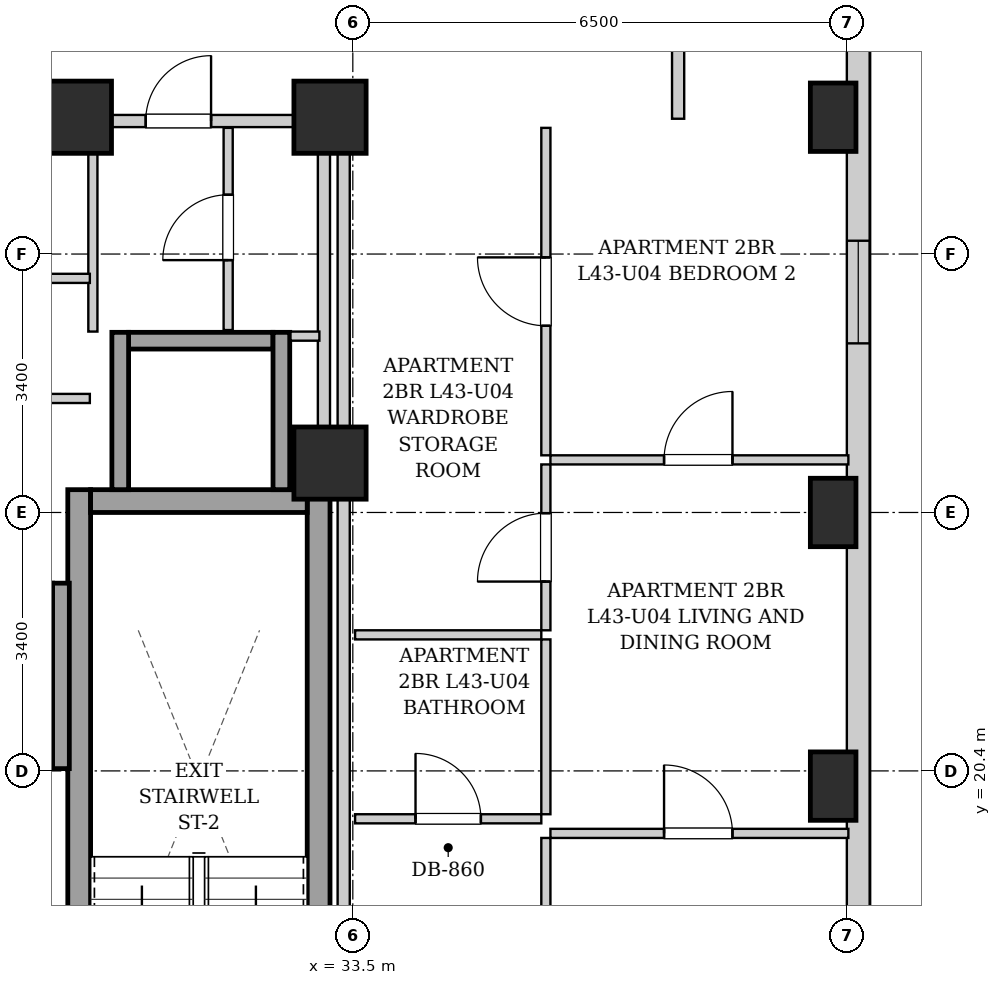
"""IFC4 building model, lengths in metres.
Left out: names, types, materials, properties, quantities, classifications, styles, units other than length and angle.
Written with IfcOpenShell. Run it as: python <this file> out.ifc"""

import sys

from ifc_helpers import new_model, si_unit, direction, frame, frame_2d, origin, origin_2d, place, context, subcontext, project, spatial, rectangle, extrude, element, fill, save


model = new_model("IFC4")
c1 = context("Model", 3, precision=1e-05, world=origin(), true_north=direction((0.0, 1.0)))
c2 = subcontext(c1, "Body", "Model", "MODEL_VIEW")
j1 = project(units=[si_unit("LENGTHUNIT", "METRE"), si_unit("PLANEANGLEUNIT", "RADIAN")], contexts=[c1])
p1 = place(None, origin())
s1 = spatial("IfcSite", under=j1, at=p1, CompositionType="ELEMENT")
p2 = place(p1, origin())
s2 = spatial("IfcBuilding", under=s1, at=p2, CompositionType="ELEMENT")
p3 = place(p2, frame((0.0, 0.0, 150.4)))
s3 = spatial("IfcBuildingStorey", under=s2, at=p3, CompositionType="ELEMENT", Elevation=150.4)
for number, where, z_axis, x_axis in (
    (1, (39.82, 20.2, 0.0), (0.0, 0.0, 1.0), (1.0, 0.0, 0.0)),
    (2, (39.82, 23.8, 0.0), (0.0, 0.0, 1.0), (1.0, 0.0, 0.0)),
    (3, (39.82, 29.0, 0.0), (0.0, 0.0, 1.0), (1.0, 0.0, 0.0)),
):
    element("IfcColumn", number, at=place(p3, frame(where, z_axis=z_axis, x_axis=x_axis)), inside=s3, PredefinedType="COLUMN", context=c2, shape_type="SweptSolid", body=[
        extrude(rectangle(XDim=0.6, YDim=0.9, at=origin_2d()), origin(), (0.0, 0.0, 1.0), 3.25),
    ])
for number, where, z_axis, x_axis in (
    (4, (29.85, 29.0, 0.0), (0.0, 0.0, 1.0), (1.0, 0.0, 0.0)),
    (5, (33.2, 29.0, 0.0), (0.0, 0.0, 1.0), (1.0, 0.0, 0.0)),
    (6, (33.2, 24.45, 0.0), (0.0, 0.0, 1.0), (1.0, 0.0, 0.0)),
):
    element("IfcColumn", number, at=place(p3, frame(where, z_axis=z_axis, x_axis=x_axis)), inside=s3, PredefinedType="COLUMN", context=c2, shape_type="SweptSolid", body=[
        extrude(rectangle(XDim=0.95, YDim=0.95, at=origin_2d()), origin(), (0.0, 0.0, 1.0), 3.25),
    ])
p4 = place(p3, frame((40.15, 40.8, 0.0), z_axis=(0.0, 0.0, 1.0), x_axis=(0.0, -1.0, 0.0)))
e7 = element("IfcWall", 7, at=p4, inside=s3, PredefinedType="SOLIDWALL", context=c2, shape_type="SweptSolid", body=[
    extrude(rectangle(XDim=34.5, YDim=0.3, at=frame_2d((17.25, 0.0))), origin(), (0.0, 0.0, 1.0), 2.99),
])
p5 = place(p4, frame((31.725, 0.0, 0.55)))
e8 = element("IfcOpeningElement", 8, at=p5, cuts=e7, PredefinedType="OPENING", context=c2, shape_type="SweptSolid", body=[
    extrude(rectangle(XDim=1.35, YDim=1.2, at=frame_2d((0.675, 0.6))), frame((0.0, 0.16, 0.0), z_axis=(0.0, -1.0, 0.0), x_axis=(1.0, 0.0, 0.0)), (0.0, 0.0, 1.0), 0.32),
])
p6 = place(p4, frame((22.8, 0.0, 0.55)))
e9 = element("IfcOpeningElement", 9, at=p6, cuts=e7, PredefinedType="OPENING", context=c2, shape_type="SweptSolid", body=[
    extrude(rectangle(XDim=1.35, YDim=1.2, at=frame_2d((0.675, 0.6))), frame((0.0, 0.16, 0.0), z_axis=(0.0, -1.0, 0.0), x_axis=(1.0, 0.0, 0.0)), (0.0, 0.0, 1.0), 0.32),
])
p7 = place(p4, frame((13.425, 0.0, 0.55)))
e10 = element("IfcOpeningElement", 10, at=p7, cuts=e7, PredefinedType="OPENING", context=c2, shape_type="SweptSolid", body=[
    extrude(rectangle(XDim=1.35, YDim=1.2, at=frame_2d((0.675, 0.6))), frame((0.0, 0.16, 0.0), z_axis=(0.0, -1.0, 0.0), x_axis=(1.0, 0.0, 0.0)), (0.0, 0.0, 1.0), 0.32),
])
for number, where, z_axis, x_axis in (
    (11, (29.9, 15.1, 0.0), (0.0, 0.0, 1.0), (0.0, 1.0, 0.0)),
    (12, (33.05, 15.1, 0.0), (0.0, 0.0, 1.0), (0.0, 1.0, 0.0)),
):
    element("IfcWall", number, at=place(p3, frame(where, z_axis=z_axis, x_axis=x_axis)), inside=s3, PredefinedType="SHEAR", context=c2, shape_type="SweptSolid", body=[
        extrude(rectangle(XDim=9.0, YDim=0.3, at=frame_2d((4.5, 0.0))), origin(), (0.0, 0.0, 1.0), 2.99),
    ])
p8 = place(p3, frame((30.05, 23.95, 0.0), z_axis=(0.0, 0.0, 1.0), x_axis=(1.0, 0.0, 0.0)))
e13 = element("IfcWall", 13, at=p8, inside=s3, PredefinedType="SHEAR", context=c2, shape_type="SweptSolid", body=[
    extrude(rectangle(XDim=2.85, YDim=0.3, at=frame_2d((1.425, 0.0))), origin(), (0.0, 0.0, 1.0), 2.99),
])
p9 = place(p3, frame((27.65, 20.54, 0.0), z_axis=(0.0, 0.0, 1.0), x_axis=(1.0, 0.0, 0.0)))
e14 = element("IfcWall", 14, at=p9, inside=s3, PredefinedType="SHEAR", context=c2, shape_type="SweptSolid", body=[
    extrude(rectangle(XDim=1.9, YDim=0.22, at=frame_2d((0.95, 0.0))), origin(), (0.0, 0.0, 1.0), 2.99),
])
p10 = place(p3, frame((27.65, 22.76, 0.0), z_axis=(0.0, 0.0, 1.0), x_axis=(1.0, 0.0, 0.0)))
e15 = element("IfcWall", 15, at=p10, inside=s3, PredefinedType="SHEAR", context=c2, shape_type="SweptSolid", body=[
    extrude(rectangle(XDim=1.9, YDim=0.22, at=frame_2d((0.95, 0.0))), origin(), (0.0, 0.0, 1.0), 2.99),
])
p11 = place(p10, frame((0.4, 0.0, 0.0)))
e16 = element("IfcOpeningElement", 16, at=p11, cuts=e15, PredefinedType="OPENING", context=c2, shape_type="SweptSolid", body=[
    extrude(rectangle(XDim=1.1, YDim=2.15, at=frame_2d((0.55, 1.075))), frame((0.0, 0.12, 0.0), z_axis=(0.0, -1.0, 0.0), x_axis=(1.0, 0.0, 0.0)), (0.0, 0.0, 1.0), 0.24),
])
p12 = place(p3, frame((29.66, 20.43, 0.0), z_axis=(0.0, 0.0, 1.0), x_axis=(0.0, 1.0, 0.0)))
e17 = element("IfcWall", 17, at=p12, inside=s3, PredefinedType="SHEAR", context=c2, shape_type="SweptSolid", body=[
    extrude(rectangle(XDim=2.44, YDim=0.22, at=frame_2d((1.22, 0.0))), origin(), (0.0, 0.0, 1.0), 2.99),
])
p13 = place(p3, frame((30.55, 26.06, 0.0), z_axis=(0.0, 0.0, 1.0), x_axis=(1.0, 0.0, 0.0)))
e18 = element("IfcWall", 18, at=p13, inside=s3, PredefinedType="SHEAR", context=c2, shape_type="SweptSolid", body=[
    extrude(rectangle(XDim=1.9, YDim=0.22, at=frame_2d((0.95, 0.0))), origin(), (0.0, 0.0, 1.0), 2.99),
])
for number, where, z_axis, x_axis in (
    (19, (30.44, 24.1, 0.0), (0.0, 0.0, 1.0), (0.0, 1.0, 0.0)),
    (20, (32.56, 24.1, 0.0), (0.0, 0.0, 1.0), (0.0, 1.0, 0.0)),
):
    element("IfcWall", number, at=place(p3, frame(where, z_axis=z_axis, x_axis=x_axis)), inside=s3, PredefinedType="SHEAR", context=c2, shape_type="SweptSolid", body=[
        extrude(rectangle(XDim=2.07, YDim=0.22, at=frame_2d((1.035, 0.0))), origin(), (0.0, 0.0, 1.0), 2.99),
    ])
p14 = place(p3, frame((33.12, 24.12, 0.0), z_axis=(0.0, 0.0, 1.0), x_axis=(0.0, 1.0, 0.0)))
e21 = element("IfcWall", 21, at=p14, inside=s3, PredefinedType="PARTITIONING", context=c2, shape_type="SweptSolid", body=[
    extrude(rectangle(XDim=4.76, YDim=0.16, at=frame_2d((2.38, 0.0))), origin(), (0.0, 0.0, 1.0), 2.99),
])
p15 = place(p3, frame((30.08, 26.18, 0.0), z_axis=(0.0, 0.0, 1.0), x_axis=(0.0, 1.0, 0.0)))
e22 = element("IfcWall", 22, at=p15, inside=s3, PredefinedType="PARTITIONING", context=c2, shape_type="SweptSolid", body=[
    extrude(rectangle(XDim=2.68, YDim=0.12, at=frame_2d((1.34, 0.0))), origin(), (0.0, 0.0, 1.0), 2.99),
])
p16 = place(p3, frame((32.68, 26.12, 0.0), z_axis=(0.0, 0.0, 1.0), x_axis=(1.0, 0.0, 0.0)))
e23 = element("IfcWall", 23, at=p16, inside=s3, PredefinedType="PARTITIONING", context=c2, shape_type="SweptSolid", body=[
    extrude(rectangle(XDim=0.38, YDim=0.12, at=frame_2d((0.19, 0.0))), origin(), (0.0, 0.0, 1.0), 2.99),
])
p17 = place(p3, frame((31.86, 26.2, 0.0), z_axis=(0.0, 0.0, 1.0), x_axis=(0.0, 1.0, 0.0)))
e24 = element("IfcWall", 24, at=p17, inside=s3, PredefinedType="PARTITIONING", context=c2, shape_type="SweptSolid", body=[
    extrude(rectangle(XDim=2.66, YDim=0.12, at=frame_2d((1.33, 0.0))), origin(), (0.0, 0.0, 1.0), 2.99),
])
p18 = place(p17, frame((0.92, 0.0, 0.0)))
e25 = element("IfcOpeningElement", 25, at=p18, cuts=e24, PredefinedType="OPENING", context=c2, shape_type="SweptSolid", body=[
    extrude(rectangle(XDim=0.86, YDim=2.05, at=frame_2d((0.43, 1.025))), frame((0.0, 0.07, 0.0), z_axis=(0.0, -1.0, 0.0), x_axis=(1.0, 0.0, 0.0)), (0.0, 0.0, 1.0), 0.14),
])
p19 = place(p3, frame((30.08, 28.95, 0.0), z_axis=(0.0, 0.0, 1.0), x_axis=(1.0, 0.0, 0.0)))
e26 = element("IfcWall", 26, at=p19, inside=s3, PredefinedType="PARTITIONING", context=c2, shape_type="SweptSolid", body=[
    extrude(rectangle(XDim=2.96, YDim=0.16, at=frame_2d((1.48, 0.0))), origin(), (0.0, 0.0, 1.0), 2.99),
])
p20 = place(p19, frame((0.695, 0.0, 0.0)))
e27 = element("IfcOpeningElement", 27, at=p20, cuts=e26, PredefinedType="OPENING", context=c2, shape_type="SweptSolid", body=[
    extrude(rectangle(XDim=0.86, YDim=2.05, at=frame_2d((0.43, 1.025))), frame((0.0, 0.09, 0.0), z_axis=(0.0, -1.0, 0.0), x_axis=(1.0, 0.0, 0.0)), (0.0, 0.0, 1.0), 0.18),
])
p21 = place(p3, frame((25.72, 26.88, 0.0), z_axis=(0.0, 0.0, 1.0), x_axis=(1.0, 0.0, 0.0)))
e28 = element("IfcWall", 28, at=p21, inside=s3, PredefinedType="PARTITIONING", context=c2, shape_type="SweptSolid", body=[
    extrude(rectangle(XDim=4.32, YDim=0.12, at=frame_2d((2.16, 0.0))), origin(), (0.0, 0.0, 1.0), 2.99),
])
p22 = place(p3, frame((25.72, 25.3, 0.0), z_axis=(0.0, 0.0, 1.0), x_axis=(1.0, 0.0, 0.0)))
e29 = element("IfcWall", 29, at=p22, inside=s3, PredefinedType="PARTITIONING", context=c2, shape_type="SweptSolid", body=[
    extrude(rectangle(XDim=4.32, YDim=0.12, at=frame_2d((2.16, 0.0))), origin(), (0.0, 0.0, 1.0), 2.99),
])
p23 = place(p22, frame((1.65, 0.0, 0.0)))
e30 = element("IfcOpeningElement", 30, at=p23, cuts=e29, PredefinedType="OPENING", context=c2, shape_type="SweptSolid", body=[
    extrude(rectangle(XDim=0.9, YDim=2.05, at=frame_2d((0.45, 1.025))), frame((0.0, 0.07, 0.0), z_axis=(0.0, -1.0, 0.0), x_axis=(1.0, 0.0, 0.0)), (0.0, 0.0, 1.0), 0.14),
])
p24 = place(p3, frame((25.72, 28.95, 0.0), z_axis=(0.0, 0.0, 1.0), x_axis=(1.0, 0.0, 0.0)))
e31 = element("IfcWall", 31, at=p24, inside=s3, PredefinedType="PARTITIONING", context=c2, shape_type="SweptSolid", body=[
    extrude(rectangle(XDim=4.32, YDim=0.16, at=frame_2d((2.16, 0.0))), origin(), (0.0, 0.0, 1.0), 2.442),
])
p25 = place(p24, frame((1.27, 0.0, 0.0)))
e32 = element("IfcOpeningElement", 32, at=p25, cuts=e31, PredefinedType="OPENING", context=c2, shape_type="SweptSolid", body=[
    extrude(rectangle(XDim=0.86, YDim=2.05, at=frame_2d((0.43, 1.025))), frame((0.0, 0.09, 0.0), z_axis=(0.0, -1.0, 0.0), x_axis=(1.0, 0.0, 0.0)), (0.0, 0.0, 1.0), 0.18),
])
p26 = place(p3, frame((37.78, 28.98, 0.0), z_axis=(0.0, 0.0, 1.0), x_axis=(0.0, 1.0, 0.0)))
e33 = element("IfcWall", 33, at=p26, inside=s3, PredefinedType="PARTITIONING", context=c2, shape_type="SweptSolid", body=[
    extrude(rectangle(XDim=1.74, YDim=0.16, at=frame_2d((0.87, 0.0))), origin(), (0.0, 0.0, 1.0), 2.99),
])
p27 = place(p3, frame((33.53, 22.19, 0.0), z_axis=(0.0, 0.0, 1.0), x_axis=(1.0, 0.0, 0.0)))
e34 = element("IfcWall", 34, at=p27, inside=s3, PredefinedType="PARTITIONING", context=c2, shape_type="SweptSolid", body=[
    extrude(rectangle(XDim=2.45, YDim=0.12, at=frame_2d((1.225, 0.0))), origin(), (0.0, 0.0, 1.0), 2.99),
])
p28 = place(p3, frame((36.04, 22.25, 0.0), z_axis=(0.0, 0.0, 1.0), x_axis=(0.0, 1.0, 0.0)))
e35 = element("IfcWall", 35, at=p28, inside=s3, PredefinedType="PARTITIONING", context=c2, shape_type="SweptSolid", body=[
    extrude(rectangle(XDim=2.182, YDim=0.12, at=frame_2d((1.091, 0.0))), origin(), (0.0, 0.0, 1.0), 2.99),
])
p29 = place(p28, frame((0.641, 0.0, 0.0)))
e36 = element("IfcOpeningElement", 36, at=p29, cuts=e35, PredefinedType="OPENING", context=c2, shape_type="SweptSolid", body=[
    extrude(rectangle(XDim=0.9, YDim=2.05, at=frame_2d((0.45, 1.025))), frame((0.0, 0.07, 0.0), z_axis=(0.0, -1.0, 0.0), x_axis=(1.0, 0.0, 0.0)), (0.0, 0.0, 1.0), 0.14),
])
p30 = place(p3, frame((36.04, 24.552, 0.0), z_axis=(0.0, 0.0, 1.0), x_axis=(0.0, 1.0, 0.0)))
e37 = element("IfcWall", 37, at=p30, inside=s3, PredefinedType="PARTITIONING", context=c2, shape_type="SweptSolid", body=[
    extrude(rectangle(XDim=4.308, YDim=0.12, at=frame_2d((2.154, 0.0))), origin(), (0.0, 0.0, 1.0), 2.99),
])
p31 = place(p30, frame((1.704, 0.0, 0.0)))
e38 = element("IfcOpeningElement", 38, at=p31, cuts=e37, PredefinedType="OPENING", context=c2, shape_type="SweptSolid", body=[
    extrude(rectangle(XDim=0.9, YDim=2.05, at=frame_2d((0.45, 1.025))), frame((0.0, 0.07, 0.0), z_axis=(0.0, -1.0, 0.0), x_axis=(1.0, 0.0, 0.0)), (0.0, 0.0, 1.0), 0.14),
])
p32 = place(p3, frame((33.53, 19.77, 0.0), z_axis=(0.0, 0.0, 1.0), x_axis=(1.0, 0.0, 0.0)))
e39 = element("IfcWall", 39, at=p32, inside=s3, PredefinedType="PARTITIONING", context=c2, shape_type="SweptSolid", body=[
    extrude(rectangle(XDim=2.45, YDim=0.12, at=frame_2d((1.225, 0.0))), origin(), (0.0, 0.0, 1.0), 2.99),
])
p33 = place(p32, frame((0.795, 0.0, 0.0)))
e40 = element("IfcOpeningElement", 40, at=p33, cuts=e39, PredefinedType="OPENING", context=c2, shape_type="SweptSolid", body=[
    extrude(rectangle(XDim=0.86, YDim=2.05, at=frame_2d((0.43, 1.025))), frame((0.0, 0.07, 0.0), z_axis=(0.0, -1.0, 0.0), x_axis=(1.0, 0.0, 0.0)), (0.0, 0.0, 1.0), 0.14),
])
p34 = place(p3, frame((36.04, 19.83, 0.0), z_axis=(0.0, 0.0, 1.0), x_axis=(0.0, 1.0, 0.0)))
e41 = element("IfcWall", 41, at=p34, inside=s3, PredefinedType="PARTITIONING", context=c2, shape_type="SweptSolid", body=[
    extrude(rectangle(XDim=2.3, YDim=0.12, at=frame_2d((1.15, 0.0))), origin(), (0.0, 0.0, 1.0), 2.99),
])
p35 = place(p3, frame((36.04, 15.21, 0.0), z_axis=(0.0, 0.0, 1.0), x_axis=(0.0, 1.0, 0.0)))
e42 = element("IfcWall", 42, at=p35, inside=s3, PredefinedType="PARTITIONING", context=c2, shape_type="SweptSolid", body=[
    extrude(rectangle(XDim=4.308, YDim=0.12, at=frame_2d((2.154, 0.0))), origin(), (0.0, 0.0, 1.0), 2.99),
])
p36 = place(p35, frame((1.704, 0.0, 0.0)))
e43 = element("IfcOpeningElement", 43, at=p36, cuts=e42, PredefinedType="OPENING", context=c2, shape_type="SweptSolid", body=[
    extrude(rectangle(XDim=0.9, YDim=2.05, at=frame_2d((0.45, 1.025))), frame((0.0, 0.07, 0.0), z_axis=(0.0, -1.0, 0.0), x_axis=(1.0, 0.0, 0.0)), (0.0, 0.0, 1.0), 0.14),
])
p37 = place(p3, frame((36.1, 19.578, 0.0), z_axis=(0.0, 0.0, 1.0), x_axis=(1.0, 0.0, 0.0)))
e44 = element("IfcWall", 44, at=p37, inside=s3, PredefinedType="PARTITIONING", context=c2, shape_type="SweptSolid", body=[
    extrude(rectangle(XDim=3.92, YDim=0.12, at=frame_2d((1.96, 0.0))), origin(), (0.0, 0.0, 1.0), 2.99),
])
p38 = place(p37, frame((1.495, 0.0, 0.0)))
e45 = element("IfcOpeningElement", 45, at=p38, cuts=e44, PredefinedType="OPENING", context=c2, shape_type="SweptSolid", body=[
    extrude(rectangle(XDim=0.9, YDim=2.05, at=frame_2d((0.45, 1.025))), frame((0.0, 0.07, 0.0), z_axis=(0.0, -1.0, 0.0), x_axis=(1.0, 0.0, 0.0)), (0.0, 0.0, 1.0), 0.14),
])
p39 = place(p3, frame((36.1, 24.492, 0.0), z_axis=(0.0, 0.0, 1.0), x_axis=(1.0, 0.0, 0.0)))
e46 = element("IfcWall", 46, at=p39, inside=s3, PredefinedType="PARTITIONING", context=c2, shape_type="SweptSolid", body=[
    extrude(rectangle(XDim=3.92, YDim=0.12, at=frame_2d((1.96, 0.0))), origin(), (0.0, 0.0, 1.0), 2.621),
])
p40 = place(p39, frame((1.495, 0.0, 0.0)))
e47 = element("IfcOpeningElement", 47, at=p40, cuts=e46, PredefinedType="OPENING", context=c2, shape_type="SweptSolid", body=[
    extrude(rectangle(XDim=0.9, YDim=2.05, at=frame_2d((0.45, 1.025))), frame((0.0, 0.07, 0.0), z_axis=(0.0, -1.0, 0.0), x_axis=(1.0, 0.0, 0.0)), (0.0, 0.0, 1.0), 0.14),
])
p41 = place(p3, frame((33.38, 15.02, 0.0), z_axis=(0.0, 0.0, 1.0), x_axis=(0.0, 1.0, 0.0)))
e48 = element("IfcWall", 48, at=p41, inside=s3, PredefinedType="PARTITIONING", context=c2, shape_type="SweptSolid", body=[
    extrude(rectangle(XDim=13.98, YDim=0.16, at=frame_2d((6.99, 0.0))), origin(), (0.0, 0.0, 1.0), 2.99),
])
p42 = place(p18, origin())
e49 = element("IfcDoor", 49, at=p42, inside=s3, OperationType="SINGLE_SWING_LEFT", PredefinedType="DOOR", context=c2, shape_type="SweptSolid", body=[
    extrude(rectangle(XDim=0.86, YDim=2.05, at=frame_2d((0.43, 1.025))), frame((0.0, 0.025, 0.0), z_axis=(0.0, -1.0, 0.0), x_axis=(1.0, 0.0, 0.0)), (0.0, 0.0, 1.0), 0.05),
])
fill(e25, e49)
p43 = place(p20, origin())
e50 = element("IfcDoor", 50, at=p43, inside=s3, OperationType="SINGLE_SWING_RIGHT", PredefinedType="DOOR", context=c2, shape_type="SweptSolid", body=[
    extrude(rectangle(XDim=0.86, YDim=2.05, at=frame_2d((0.43, 1.025))), frame((0.0, 0.025, 0.0), z_axis=(0.0, -1.0, 0.0), x_axis=(1.0, 0.0, 0.0)), (0.0, 0.0, 1.0), 0.05),
])
fill(e27, e50)
p44 = place(p29, origin())
e51 = element("IfcDoor", 51, at=p44, inside=s3, OperationType="SINGLE_SWING_LEFT", PredefinedType="DOOR", context=c2, shape_type="SweptSolid", body=[
    extrude(rectangle(XDim=0.9, YDim=2.05, at=frame_2d((0.45, 1.025))), frame((0.0, 0.025, 0.0), z_axis=(0.0, -1.0, 0.0), x_axis=(1.0, 0.0, 0.0)), (0.0, 0.0, 1.0), 0.05),
])
fill(e36, e51)
p45 = place(p31, origin())
e52 = element("IfcDoor", 52, at=p45, inside=s3, OperationType="SINGLE_SWING_RIGHT", PredefinedType="DOOR", context=c2, shape_type="SweptSolid", body=[
    extrude(rectangle(XDim=0.9, YDim=2.05, at=frame_2d((0.45, 1.025))), frame((0.0, 0.025, 0.0), z_axis=(0.0, -1.0, 0.0), x_axis=(1.0, 0.0, 0.0)), (0.0, 0.0, 1.0), 0.05),
])
fill(e38, e52)
p46 = place(p33, origin())
e53 = element("IfcDoor", 53, at=p46, inside=s3, OperationType="SINGLE_SWING_LEFT", PredefinedType="DOOR", context=c2, shape_type="SweptSolid", body=[
    extrude(rectangle(XDim=0.86, YDim=2.05, at=frame_2d((0.43, 1.025))), frame((0.0, 0.025, 0.0), z_axis=(0.0, -1.0, 0.0), x_axis=(1.0, 0.0, 0.0)), (0.0, 0.0, 1.0), 0.05),
])
fill(e40, e53)
p47 = place(p38, origin())
e54 = element("IfcDoor", 54, at=p47, inside=s3, OperationType="SINGLE_SWING_LEFT", PredefinedType="DOOR", context=c2, shape_type="SweptSolid", body=[
    extrude(rectangle(XDim=0.9, YDim=2.05, at=frame_2d((0.45, 1.025))), frame((0.0, 0.025, 0.0), z_axis=(0.0, -1.0, 0.0), x_axis=(1.0, 0.0, 0.0)), (0.0, 0.0, 1.0), 0.05),
])
fill(e45, e54)
p48 = place(p40, origin())
e55 = element("IfcDoor", 55, at=p48, inside=s3, OperationType="SINGLE_SWING_RIGHT", PredefinedType="DOOR", context=c2, shape_type="SweptSolid", body=[
    extrude(rectangle(XDim=0.9, YDim=2.05, at=frame_2d((0.45, 1.025))), frame((0.0, 0.025, 0.0), z_axis=(0.0, -1.0, 0.0), x_axis=(1.0, 0.0, 0.0)), (0.0, 0.0, 1.0), 0.05),
])
fill(e47, e55)
p49 = place(p7, origin())
e56 = element("IfcWindow", 56, at=p49, inside=s3, PartitioningType="SINGLE_PANEL", PredefinedType="WINDOW", context=c2, shape_type="SweptSolid", body=[
    extrude(rectangle(XDim=1.35, YDim=1.2, at=frame_2d((0.675, 0.6))), frame((0.0, 0.03, 0.0), z_axis=(0.0, -1.0, 0.0), x_axis=(1.0, 0.0, 0.0)), (0.0, 0.0, 1.0), 0.06),
])
fill(e10, e56)
save(model, sys.argv[1])
